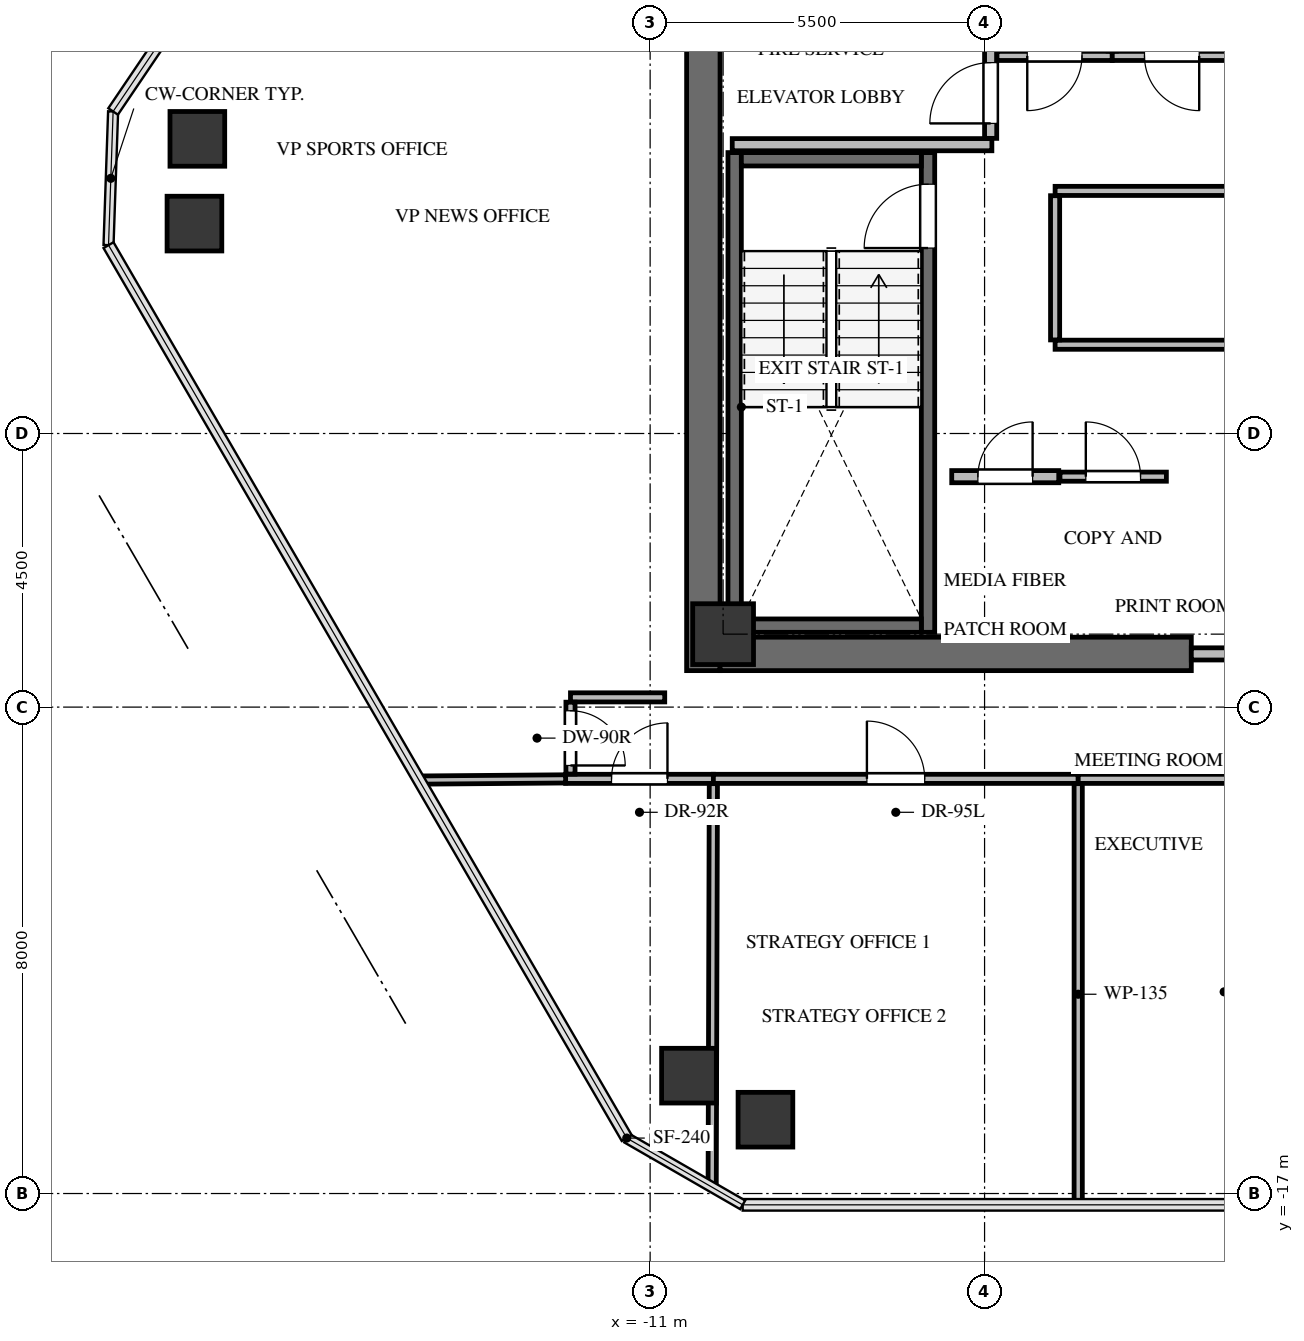
"""IFC4 building model, lengths in metres.
Left out: names, types, materials, properties, quantities, classifications, styles, units other than length and angle.
Written with IfcOpenShell. Run it as: python <this file> out.ifc"""

import sys

from ifc_helpers import new_model, si_unit, direction, frame, frame_2d, origin, origin_2d, place, context, subcontext, project, spatial, rectangle, extrude, source, transform, mapped, element, fill, save


model = new_model("IFC4")
c1 = context("Model", 3, precision=1e-05, world=origin(), true_north=direction((0.0, 1.0)))
c2 = subcontext(c1, "Body", "Model", "MODEL_VIEW")
j1 = project(units=[si_unit("LENGTHUNIT", "METRE"), si_unit("PLANEANGLEUNIT", "RADIAN")], contexts=[c1])
p1 = place(None, origin())
s1 = spatial("IfcSite", under=j1, at=p1, CompositionType="ELEMENT")
p2 = place(p1, origin())
s2 = spatial("IfcBuilding", under=s1, at=p2, CompositionType="ELEMENT")
p3 = place(p2, frame((0.0, 0.0, 231.5)))
s3 = spatial("IfcBuildingStorey", under=s2, at=p3, CompositionType="ELEMENT", Elevation=231.5)
p4 = place(p3, frame((-10.125, -8.4, 0.0), z_axis=(0.0, 0.0, 1.0), x_axis=(0.0, 1.0, 0.0)))
e1 = element("IfcWall", 1, at=p4, inside=s3, PredefinedType="SHEAR", context=c2, shape_type="SweptSolid", body=[
    extrude(rectangle(XDim=16.8, YDim=0.55, at=frame_2d((8.4, 0.0))), origin(), (0.0, 0.0, 1.0), 3.3),
])
p5 = place(p3, frame((-9.85, -8.125, 0.0), z_axis=(0.0, 0.0, 1.0), x_axis=(1.0, 0.0, 0.0)))
e2 = element("IfcWall", 2, at=p5, inside=s3, PredefinedType="SHEAR", context=c2, shape_type="SweptSolid", body=[
    extrude(rectangle(XDim=7.75, YDim=0.55, at=frame_2d((3.875, 0.0))), origin(), (0.0, 0.0, 1.0), 3.3),
])
p6 = place(p3, frame((-6.43, -7.77, -0.24), z_axis=(0.0, 0.0, 1.0), x_axis=(0.0, 1.0, 0.0)))
e3 = element("IfcWall", 3, at=p6, inside=s3, PredefinedType="SHEAR", context=c2, shape_type="SweptSolid", body=[
    extrude(rectangle(XDim=7.89, YDim=0.22, at=frame_2d((3.945, 0.0))), origin(), (0.0, 0.0, 1.0), 3.3),
])
p7 = place(p6, frame((6.32, 0.0, 0.0)))
e4 = element("IfcOpeningElement", 4, at=p7, cuts=e3, PredefinedType="OPENING", context=c2, shape_type="SweptSolid", body=[
    extrude(rectangle(XDim=1.05, YDim=2.15, at=frame_2d((0.525, 1.075))), frame((0.0, 0.12, 0.0), z_axis=(0.0, -1.0, 0.0), x_axis=(1.0, 0.0, 0.0)), (0.0, 0.0, 1.0), 0.24),
])
p8 = place(p3, frame((-9.61, 0.12, -0.24), z_axis=(0.0, 0.0, 1.0), x_axis=(0.0, -1.0, 0.0)))
e5 = element("IfcWall", 5, at=p8, inside=s3, PredefinedType="SHEAR", context=c2, shape_type="SweptSolid", body=[
    extrude(rectangle(XDim=7.89, YDim=0.22, at=frame_2d((3.945, 0.0))), origin(), (0.0, 0.0, 1.0), 3.3),
])
for number, where, z_axis, x_axis in (
    (6, (-9.5, -7.66, -0.24), (0.0, 0.0, 1.0), (1.0, 0.0, 0.0)),
    (7, (-6.54, 0.01, -0.24), (0.0, 0.0, 1.0), (-1.0, 0.0, 0.0)),
):
    element("IfcWall", number, at=place(p3, frame(where, z_axis=z_axis, x_axis=x_axis)), inside=s3, PredefinedType="SHEAR", context=c2, shape_type="SweptSolid", body=[
        extrude(rectangle(XDim=2.96, YDim=0.22, at=frame_2d((1.48, 0.0))), origin(), (0.0, 0.0, 1.0), 3.3),
    ])
m1 = source(origin(), c2, "Body", "SweptSolid", [
    extrude(rectangle(XDim=1.0, YDim=1.0, at=origin_2d()), origin(), (0.0, 0.0, 1.0), 3.3),
])
p9 = place(p3, frame((-9.8, -7.8, -0.24), z_axis=(0.0, 0.0, 1.0), x_axis=(1.0, 0.0, 0.0)))
e8 = element("IfcColumn", 8, at=p9, inside=s3, PredefinedType="COLUMN", context=c2, shape_type="MappedRepresentation", body=[
    mapped(m1, transform((0.0, 0.0, 0.0), x_axis=(1.0, 0.0, 0.0), y_axis=(0.0, 1.0, 0.0), z_axis=(0.0, 0.0, 1.0), scale=1.0)),
])
m2 = source(origin(), c2, "Body", "SweptSolid", [
    extrude(rectangle(XDim=0.9, YDim=0.9, at=origin_2d()), origin(), (0.0, 0.0, 1.0), 3.3),
])
for number, where, z_axis, x_axis in (
    (9, (-10.361, -15.062, -0.24), (0.0, 0.0, 1.0), (1.0, 0.0, 0.0)),
    (10, (-18.494, -1.048, -0.24), (0.0, 0.0, 1.0), (1.0, 0.0, 0.0)),
    (11, (-18.446, 0.346, -0.24), (0.0, 0.0, 1.0), (1.0, 0.0, 0.0)),
    (12, (-9.104, -15.786, -0.24), (0.0, 0.0, 1.0), (1.0, 0.0, 0.0)),
):
    element("IfcColumn", number, at=place(p3, frame(where, z_axis=z_axis, x_axis=x_axis)), inside=s3, PredefinedType="COLUMN", context=c2, shape_type="MappedRepresentation", body=[
        mapped(m2, transform((0.0, 0.0, 0.0), x_axis=(1.0, 0.0, 0.0), y_axis=(0.0, 1.0, 0.0), z_axis=(0.0, 0.0, 1.0), scale=1.0)),
    ])
p10 = place(p3, frame((-2.1, -8.125, 0.0), z_axis=(0.0, 0.0, 1.0), x_axis=(1.0, 0.0, 0.0)))
e13 = element("IfcWall", 13, at=p10, inside=s3, PredefinedType="SOLIDWALL", context=c2, shape_type="SweptSolid", body=[
    extrude(rectangle(XDim=4.2, YDim=0.2, at=frame_2d((2.1, 0.0))), origin(), (0.0, 0.0, 1.0), 3.045),
])
p11 = place(p10, frame((1.2, 0.0, 0.0)))
e14 = element("IfcOpeningElement", 14, at=p11, cuts=e13, PredefinedType="OPENING", context=c2, shape_type="SweptSolid", body=[
    extrude(rectangle(XDim=1.8, YDim=2.15, at=frame_2d((0.9, 1.075))), frame((0.0, 0.11, 0.0), z_axis=(0.0, -1.0, 0.0), x_axis=(1.0, 0.0, 0.0)), (0.0, 0.0, 1.0), 0.22),
])
p12 = place(p3, frame((-9.65, 0.25, 0.0), z_axis=(0.0, 0.0, 1.0), x_axis=(1.0, 0.0, 0.0)))
e15 = element("IfcWall", 15, at=p12, inside=s3, PredefinedType="SOLIDWALL", context=c2, shape_type="SweptSolid", body=[
    extrude(rectangle(XDim=4.27, YDim=0.2, at=frame_2d((2.135, 0.0))), origin(), (0.0, 0.0, 1.0), 3.045),
])
p13 = place(p3, frame((-5.4, 0.354, 0.0), z_axis=(0.0, 0.0, 1.0), x_axis=(0.0, 1.0, 0.0)))
e16 = element("IfcWall", 16, at=p13, inside=s3, PredefinedType="SOLIDWALL", context=c2, shape_type="SweptSolid", body=[
    extrude(rectangle(XDim=4.026, YDim=0.2, at=frame_2d((2.013, 0.0))), origin(), (0.0, 0.0, 1.0), 3.045),
])
p14 = place(p13, frame((0.246, 0.0, 0.0)))
e17 = element("IfcOpeningElement", 17, at=p14, cuts=e16, PredefinedType="OPENING", context=c2, shape_type="SweptSolid", body=[
    extrude(rectangle(XDim=1.0, YDim=2.15, at=frame_2d((0.5, 1.075))), frame((0.0, 0.11, 0.0), z_axis=(0.0, -1.0, 0.0), x_axis=(1.0, 0.0, 0.0)), (0.0, 0.0, 1.0), 0.22),
])
p15 = place(p3, frame((-6.04, -5.21, 0.0), z_axis=(0.0, 0.0, 1.0), x_axis=(1.0, 0.0, 0.0)))
e18 = element("IfcWall", 18, at=p15, inside=s3, PredefinedType="SOLIDWALL", context=c2, shape_type="SweptSolid", body=[
    extrude(rectangle(XDim=1.76, YDim=0.2, at=frame_2d((0.88, 0.0))), origin(), (0.0, 0.0, 1.0), 3.045),
])
p16 = place(p15, frame((0.43, 0.0, 0.0)))
e19 = element("IfcOpeningElement", 19, at=p16, cuts=e18, PredefinedType="OPENING", context=c2, shape_type="SweptSolid", body=[
    extrude(rectangle(XDim=0.9, YDim=2.05, at=frame_2d((0.45, 1.025))), frame((0.0, 0.11, 0.0), z_axis=(0.0, -1.0, 0.0), x_axis=(1.0, 0.0, 0.0)), (0.0, 0.0, 1.0), 0.22),
])
p17 = place(p3, frame((-4.26, -5.21, 0.0), z_axis=(0.0, 0.0, 1.0), x_axis=(1.0, 0.0, 0.0)))
e20 = element("IfcWall", 20, at=p17, inside=s3, PredefinedType="PARTITIONING", context=c2, shape_type="SweptSolid", body=[
    extrude(rectangle(XDim=1.75, YDim=0.15, at=frame_2d((0.875, 0.0))), origin(), (0.0, 0.0, 1.0), 3.045),
])
p18 = place(p17, frame((0.425, 0.0, 0.0)))
e21 = element("IfcOpeningElement", 21, at=p18, cuts=e20, PredefinedType="OPENING", context=c2, shape_type="SweptSolid", body=[
    extrude(rectangle(XDim=0.9, YDim=2.05, at=frame_2d((0.45, 1.025))), frame((0.0, 0.085, 0.0), z_axis=(0.0, -1.0, 0.0), x_axis=(1.0, 0.0, 0.0)), (0.0, 0.0, 1.0), 0.17),
])
p19 = place(p3, frame((3.14, -3.04, 0.0), z_axis=(0.0, 0.0, 1.0), x_axis=(-1.0, 0.0, 0.0)))
e22 = element("IfcWall", 22, at=p19, inside=s3, PredefinedType="PARTITIONING", context=c2, shape_type="SweptSolid", body=[
    extrude(rectangle(XDim=7.48, YDim=0.15, at=frame_2d((3.74, 0.0))), origin(), (0.0, 0.0, 1.0), 3.045),
])
p20 = place(p19, frame((3.29, 0.0, 0.0)))
e23 = element("IfcOpeningElement", 23, at=p20, cuts=e22, PredefinedType="OPENING", context=c2, shape_type="SweptSolid", body=[
    extrude(rectangle(XDim=0.9, YDim=2.05, at=frame_2d((0.45, 1.025))), frame((0.0, 0.085, 0.0), z_axis=(0.0, -1.0, 0.0), x_axis=(1.0, 0.0, 0.0)), (0.0, 0.0, 1.0), 0.17),
])
p21 = place(p3, frame((-4.34, -0.51, 0.0), z_axis=(0.0, 0.0, 1.0), x_axis=(1.0, 0.0, 0.0)))
e24 = element("IfcWall", 24, at=p21, inside=s3, PredefinedType="PARTITIONING", context=c2, shape_type="SweptSolid", body=[
    extrude(rectangle(XDim=7.48, YDim=0.15, at=frame_2d((3.74, 0.0))), origin(), (0.0, 0.0, 1.0), 3.045),
])
p22 = place(p3, frame((-4.34, -2.961, 0.0), z_axis=(0.0, 0.0, 1.0), x_axis=(0.0, 1.0, 0.0)))
e25 = element("IfcWall", 25, at=p22, inside=s3, PredefinedType="PARTITIONING", context=c2, shape_type="SweptSolid", body=[
    extrude(rectangle(XDim=2.372, YDim=0.15, at=frame_2d((1.186, 0.0))), origin(), (0.0, 0.0, 1.0), 3.045),
])
p23 = place(p3, frame((-3.4, 1.71, 0.0), z_axis=(0.0, 0.0, 1.0), x_axis=(-1.0, 0.0, 0.0)))
e26 = element("IfcWall", 26, at=p23, inside=s3, PredefinedType="PARTITIONING", context=c2, shape_type="SweptSolid", body=[
    extrude(rectangle(XDim=1.896, YDim=0.15, at=frame_2d((0.948, 0.0))), origin(), (0.0, 0.0, 1.0), 3.045),
])
p24 = place(p23, frame((0.498, 0.0, 0.0)))
e27 = element("IfcOpeningElement", 27, at=p24, cuts=e26, PredefinedType="OPENING", context=c2, shape_type="SweptSolid", body=[
    extrude(rectangle(XDim=0.9, YDim=2.05, at=frame_2d((0.45, 1.025))), frame((0.0, 0.085, 0.0), z_axis=(0.0, -1.0, 0.0), x_axis=(1.0, 0.0, 0.0)), (0.0, 0.0, 1.0), 0.17),
])
p25 = place(p3, frame((-1.44, 1.71, 0.0), z_axis=(0.0, 0.0, 1.0), x_axis=(-1.0, 0.0, 0.0)))
e28 = element("IfcWall", 28, at=p25, inside=s3, PredefinedType="PARTITIONING", context=c2, shape_type="SweptSolid", body=[
    extrude(rectangle(XDim=1.96, YDim=0.15, at=frame_2d((0.98, 0.0))), origin(), (0.0, 0.0, 1.0), 3.045),
])
p26 = place(p25, frame((0.53, 0.0, 0.0)))
e29 = element("IfcOpeningElement", 29, at=p26, cuts=e28, PredefinedType="OPENING", context=c2, shape_type="SweptSolid", body=[
    extrude(rectangle(XDim=0.9, YDim=2.05, at=frame_2d((0.45, 1.025))), frame((0.0, 0.085, 0.0), z_axis=(0.0, -1.0, 0.0), x_axis=(1.0, 0.0, 0.0)), (0.0, 0.0, 1.0), 0.17),
])
p27 = place(p3, frame((-12.39, -10.18, 0.0), z_axis=(0.0, 0.0, 1.0), x_axis=(1.0, 0.0, 0.0)))
e30 = element("IfcWall", 30, at=p27, inside=s3, PredefinedType="PARTITIONING", context=c2, shape_type="SweptSolid", body=[
    extrude(rectangle(XDim=2.43, YDim=0.15, at=frame_2d((1.215, 0.0))), origin(), (0.0, 0.0, 1.0), 3.045),
])
p28 = place(p27, frame((0.755, 0.0, 0.0)))
e31 = element("IfcOpeningElement", 31, at=p28, cuts=e30, PredefinedType="OPENING", context=c2, shape_type="SweptSolid", body=[
    extrude(rectangle(XDim=0.92, YDim=2.1, at=frame_2d((0.46, 1.05))), frame((0.0, 0.085, 0.0), z_axis=(0.0, -1.0, 0.0), x_axis=(1.0, 0.0, 0.0)), (0.0, 0.0, 1.0), 0.17),
])
p29 = place(p3, frame((-9.96, -10.18, 0.0), z_axis=(0.0, 0.0, 1.0), x_axis=(1.0, 0.0, 0.0)))
e32 = element("IfcWall", 32, at=p29, inside=s3, PredefinedType="PARTITIONING", context=c2, shape_type="SweptSolid", body=[
    extrude(rectangle(XDim=6.0, YDim=0.15, at=frame_2d((3.0, 0.0))), origin(), (0.0, 0.0, 1.0), 2.301),
])
p30 = place(p29, frame((2.525, 0.0, 0.0)))
e33 = element("IfcOpeningElement", 33, at=p30, cuts=e32, PredefinedType="OPENING", context=c2, shape_type="SweptSolid", body=[
    extrude(rectangle(XDim=0.95, YDim=2.1, at=frame_2d((0.475, 1.05))), frame((0.0, 0.085, 0.0), z_axis=(0.0, -1.0, 0.0), x_axis=(1.0, 0.0, 0.0)), (0.0, 0.0, 1.0), 0.17),
])
p31 = place(p3, frame((-3.96, -10.18, 0.0), z_axis=(0.0, 0.0, 1.0), x_axis=(1.0, 0.0, 0.0)))
e34 = element("IfcWall", 34, at=p31, inside=s3, PredefinedType="PARTITIONING", context=c2, shape_type="SweptSolid", body=[
    extrude(rectangle(XDim=2.871, YDim=0.15, at=frame_2d((1.436, 0.0))), origin(), (0.0, 0.0, 1.0), 3.045),
])
p32 = place(p3, frame((-10.76, -8.84, 0.0), z_axis=(0.0, 0.0, 1.0), x_axis=(-1.0, 0.0, 0.0)))
e35 = element("IfcWall", 35, at=p32, inside=s3, PredefinedType="PARTITIONING", context=c2, shape_type="SweptSolid", body=[
    extrude(rectangle(XDim=1.55, YDim=0.15, at=frame_2d((0.775, 0.0))), origin(), (0.0, 0.0, 1.0), 3.045),
])
p33 = place(p3, frame((-12.31, -8.919, 0.0), z_axis=(0.0, 0.0, 1.0), x_axis=(0.0, -1.0, 0.0)))
e36 = element("IfcWall", 36, at=p33, inside=s3, PredefinedType="PARTITIONING", context=c2, shape_type="SweptSolid", body=[
    extrude(rectangle(XDim=1.182, YDim=0.15, at=frame_2d((0.591, 0.0))), origin(), (0.0, 0.0, 1.0), 3.045),
])
p34 = place(p33, frame((0.141, 0.0, 0.0)))
e37 = element("IfcOpeningElement", 37, at=p34, cuts=e36, PredefinedType="OPENING", context=c2, shape_type="SweptSolid", body=[
    extrude(rectangle(XDim=0.9, YDim=2.05, at=frame_2d((0.45, 1.025))), frame((0.0, 0.085, 0.0), z_axis=(0.0, -1.0, 0.0), x_axis=(1.0, 0.0, 0.0)), (0.0, 0.0, 1.0), 0.17),
])
p35 = place(p3, frame((-9.96, -10.259, 0.0), z_axis=(0.0, 0.0, 1.0), x_axis=(-0.002979132758, -0.999995562374, 0.0)))
e38 = element("IfcWall", 38, at=p35, inside=s3, PredefinedType="PARTITIONING", context=c2, shape_type="SweptSolid", body=[
    extrude(rectangle(XDim=6.638, YDim=0.135, at=frame_2d((3.319, 0.0))), origin(), (0.0, 0.0, 1.0), 2.301),
])
p36 = place(p3, frame((-14.802, -10.2, 0.0), z_axis=(0.0, 0.0, 1.0), x_axis=(0.999968020968, 0.007997314604, 0.0)))
e39 = element("IfcWall", 39, at=p36, inside=s3, PredefinedType="PARTITIONING", context=c2, shape_type="SweptSolid", body=[
    extrude(rectangle(XDim=2.412, YDim=0.135, at=frame_2d((1.206, 0.0))), origin(), (0.0, 0.0, 1.0), 2.399),
])
p37 = place(p3, frame((-3.96, -10.259, 0.0), z_axis=(0.0, 0.0, 1.0), x_axis=(0.0, -1.0, 0.0)))
e40 = element("IfcWall", 40, at=p37, inside=s3, PredefinedType="PARTITIONING", context=c2, shape_type="SweptSolid", body=[
    extrude(rectangle(XDim=6.927, YDim=0.135, at=frame_2d((3.463, 0.0))), origin(), (0.0, 0.0, 1.0), 2.399),
])
m3 = source(origin(), c2, "Body", "SweptSolid", [
    extrude(rectangle(XDim=1.05, YDim=2.15, at=frame_2d((0.525, 1.075))), frame((0.0, 0.025, 0.0), z_axis=(0.0, -1.0, 0.0), x_axis=(1.0, 0.0, 0.0)), (0.0, 0.0, 1.0), 0.05),
])
p38 = place(p7, origin())
e41 = element("IfcDoor", 41, at=p38, inside=s3, OperationType="SINGLE_SWING_LEFT", PredefinedType="DOOR", context=c2, shape_type="MappedRepresentation", body=[
    mapped(m3, transform((0.0, 0.0, 0.0), x_axis=(1.0, 0.0, 0.0), y_axis=(0.0, 1.0, 0.0), z_axis=(0.0, 0.0, 1.0), scale=1.0)),
])
fill(e4, e41)
m4 = source(origin(), c2, "Body", "SweptSolid", [
    extrude(rectangle(XDim=1.0, YDim=2.15, at=frame_2d((0.5, 1.075))), frame((0.0, 0.025, 0.0), z_axis=(0.0, -1.0, 0.0), x_axis=(1.0, 0.0, 0.0)), (0.0, 0.0, 1.0), 0.05),
])
p39 = place(p14, origin())
e42 = element("IfcDoor", 42, at=p39, inside=s3, OperationType="SINGLE_SWING_LEFT", PredefinedType="DOOR", context=c2, shape_type="MappedRepresentation", body=[
    mapped(m4, transform((0.0, 0.0, 0.0), x_axis=(1.0, 0.0, 0.0), y_axis=(0.0, 1.0, 0.0), z_axis=(0.0, 0.0, 1.0), scale=1.0)),
])
fill(e17, e42)
m5 = source(origin(), c2, "Body", "SweptSolid", [
    extrude(rectangle(XDim=0.9, YDim=2.05, at=frame_2d((0.45, 1.025))), frame((0.0, 0.025, 0.0), z_axis=(0.0, -1.0, 0.0), x_axis=(1.0, 0.0, 0.0)), (0.0, 0.0, 1.0), 0.05),
])
p40 = place(p16, origin())
e43 = element("IfcDoor", 43, at=p40, inside=s3, OperationType="SINGLE_SWING_RIGHT", PredefinedType="DOOR", context=c2, shape_type="MappedRepresentation", body=[
    mapped(m5, transform((0.0, 0.0, 0.0), x_axis=(1.0, 0.0, 0.0), y_axis=(0.0, 1.0, 0.0), z_axis=(0.0, 0.0, 1.0), scale=1.0)),
])
fill(e19, e43)
m6 = source(origin(), c2, "Body", "SweptSolid", [
    extrude(rectangle(XDim=0.9, YDim=2.05, at=frame_2d((0.45, 1.025))), frame((0.0, 0.025, 0.0), z_axis=(0.0, -1.0, 0.0), x_axis=(1.0, 0.0, 0.0)), (0.0, 0.0, 1.0), 0.05),
])
p41 = place(p18, origin())
e44 = element("IfcDoor", 44, at=p41, inside=s3, OperationType="SINGLE_SWING_LEFT", PredefinedType="DOOR", context=c2, shape_type="MappedRepresentation", body=[
    mapped(m6, transform((0.0, 0.0, 0.0), x_axis=(1.0, 0.0, 0.0), y_axis=(0.0, 1.0, 0.0), z_axis=(0.0, 0.0, 1.0), scale=1.0)),
])
fill(e21, e44)
p42 = place(p24, origin())
e45 = element("IfcDoor", 45, at=p42, inside=s3, OperationType="SINGLE_SWING_RIGHT", PredefinedType="DOOR", context=c2, shape_type="MappedRepresentation", body=[
    mapped(m5, transform((0.0, 0.0, 0.0), x_axis=(1.0, 0.0, 0.0), y_axis=(0.0, 1.0, 0.0), z_axis=(0.0, 0.0, 1.0), scale=1.0)),
])
fill(e27, e45)
p43 = place(p26, origin())
e46 = element("IfcDoor", 46, at=p43, inside=s3, OperationType="SINGLE_SWING_LEFT", PredefinedType="DOOR", context=c2, shape_type="MappedRepresentation", body=[
    mapped(m6, transform((0.0, 0.0, 0.0), x_axis=(1.0, 0.0, 0.0), y_axis=(0.0, 1.0, 0.0), z_axis=(0.0, 0.0, 1.0), scale=1.0)),
])
fill(e29, e46)
m7 = source(origin(), c2, "Body", "SweptSolid", [
    extrude(rectangle(XDim=0.92, YDim=2.1, at=frame_2d((0.46, 1.05))), frame((0.0, 0.025, 0.0), z_axis=(0.0, -1.0, 0.0), x_axis=(1.0, 0.0, 0.0)), (0.0, 0.0, 1.0), 0.05),
])
p44 = place(p28, origin())
e47 = element("IfcDoor", 47, at=p44, inside=s3, OperationType="SINGLE_SWING_RIGHT", PredefinedType="DOOR", context=c2, shape_type="MappedRepresentation", body=[
    mapped(m7, transform((0.0, 0.0, 0.0), x_axis=(1.0, 0.0, 0.0), y_axis=(0.0, 1.0, 0.0), z_axis=(0.0, 0.0, 1.0), scale=1.0)),
])
fill(e31, e47)
m8 = source(origin(), c2, "Body", "SweptSolid", [
    extrude(rectangle(XDim=0.95, YDim=2.1, at=frame_2d((0.475, 1.05))), frame((0.0, 0.025, 0.0), z_axis=(0.0, -1.0, 0.0), x_axis=(1.0, 0.0, 0.0)), (0.0, 0.0, 1.0), 0.05),
])
p45 = place(p30, origin())
e48 = element("IfcDoor", 48, at=p45, inside=s3, OperationType="SINGLE_SWING_LEFT", PredefinedType="DOOR", context=c2, shape_type="MappedRepresentation", body=[
    mapped(m8, transform((0.0, 0.0, 0.0), x_axis=(1.0, 0.0, 0.0), y_axis=(0.0, 1.0, 0.0), z_axis=(0.0, 0.0, 1.0), scale=1.0)),
])
fill(e33, e48)
m9 = source(origin(), c2, "Body", "SweptSolid", [
    extrude(rectangle(XDim=0.9, YDim=2.05, at=frame_2d((0.45, 1.025))), frame((0.0, 0.025, 0.0), z_axis=(0.0, -1.0, 0.0), x_axis=(1.0, 0.0, 0.0)), (0.0, 0.0, 1.0), 0.05),
])
p46 = place(p34, origin())
e49 = element("IfcDoor", 49, at=p46, inside=s3, OperationType="SINGLE_SWING_RIGHT", PredefinedType="DOOR", context=c2, shape_type="MappedRepresentation", body=[
    mapped(m9, transform((0.0, 0.0, 0.0), x_axis=(1.0, 0.0, 0.0), y_axis=(0.0, 1.0, 0.0), z_axis=(0.0, 0.0, 1.0), scale=1.0)),
])
fill(e37, e49)
save(model, sys.argv[1])
